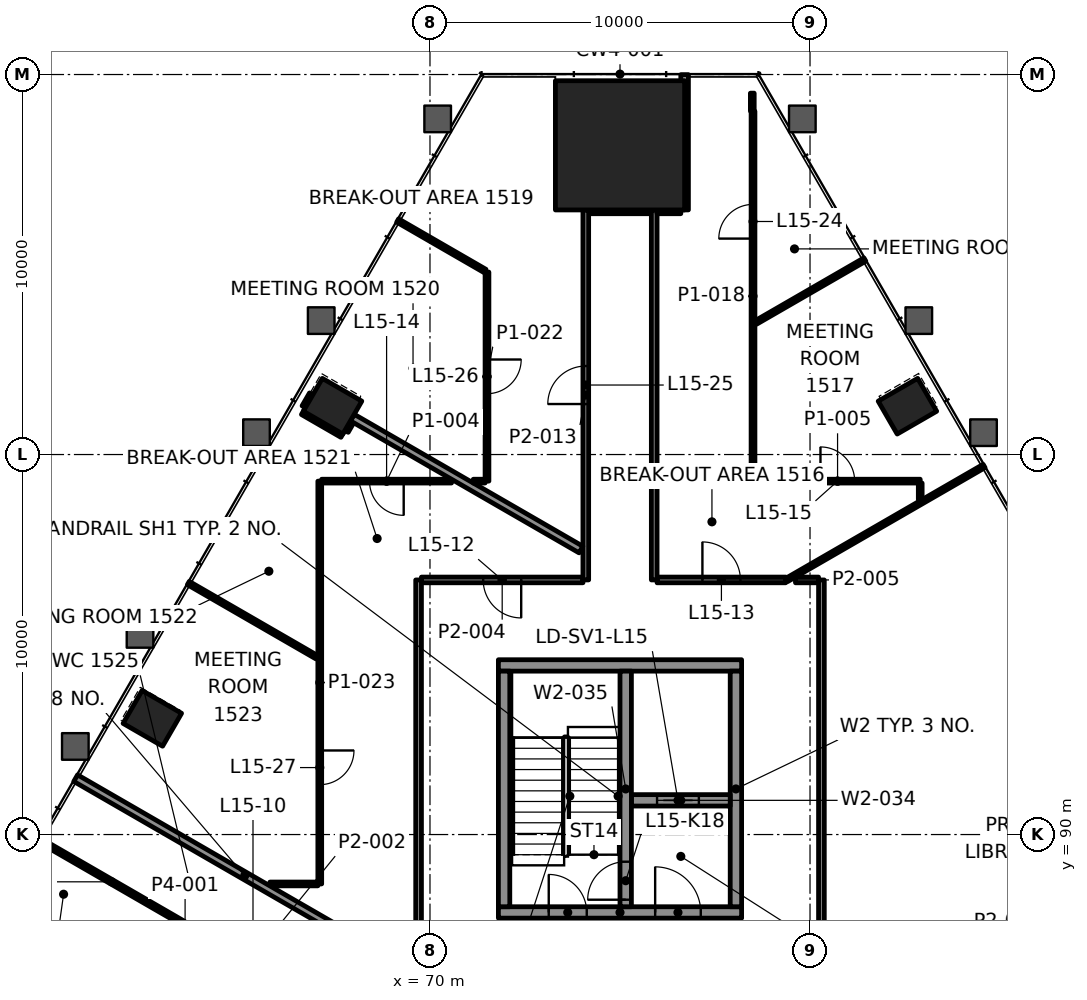
"""IFC4 building model, lengths in metres.
Left out: names, types, materials, properties, quantities, classifications, styles, units other than length and angle.
Written with IfcOpenShell. Run it as: python <this file> out.ifc"""

import sys

from ifc_helpers import new_model, si_unit, direction, frame, frame_2d, origin, origin_2d, place, context, subcontext, project, spatial, rectangle, extrude, element, fill, save


model = new_model("IFC4")
c1 = context("Model", 3, precision=1e-05, world=origin(), true_north=direction((0.0, 1.0)))
c2 = subcontext(c1, "Body", "Model", "MODEL_VIEW")
j1 = project(units=[si_unit("LENGTHUNIT", "METRE"), si_unit("PLANEANGLEUNIT", "RADIAN")], contexts=[c1])
p1 = place(None, origin())
s1 = spatial("IfcSite", under=j1, at=p1, CompositionType="ELEMENT")
p2 = place(p1, origin())
s2 = spatial("IfcBuilding", under=s1, at=p2, CompositionType="ELEMENT")
p3 = place(p2, frame((0.0, 0.0, 69.4)))
s3 = spatial("IfcBuildingStorey", under=s2, at=p3, CompositionType="ELEMENT", Elevation=69.4)
p4 = place(p3, frame((75.0, 108.136, 0.0), z_axis=(0.0, 0.0, 1.0), x_axis=(-1.0, 0.0, 0.0)))
e1 = element("IfcColumn", 1, at=p4, inside=s3, PredefinedType="COLUMN", context=c2, shape_type="SweptSolid", body=[
    extrude(rectangle(XDim=3.4, YDim=3.4, at=origin_2d()), origin(), (0.0, 0.0, 1.0), 4.2),
])
for number, where, z_axis, x_axis in (
    (2, (82.563, 101.272, -0.0), (0.0, 0.0, 1.0), (-0.5, 0.866, 0.0)),
    (3, (67.437, 101.272, -0.0), (0.0, 0.0, 1.0), (-0.5, -0.866, 0.0)),
    (4, (62.694, 93.057, -0.0), (0.0, 0.0, 1.0), (-0.5, -0.866, 0.0)),
):
    element("IfcColumn", number, at=place(p3, frame(where, z_axis=z_axis, x_axis=x_axis)), inside=s3, PredefinedType="COLUMN", context=c2, shape_type="SweptSolid", body=[
        extrude(rectangle(XDim=1.0, YDim=1.2, at=origin_2d()), origin(), (0.0, 0.0, 1.0), 4.2),
    ])
p5 = place(p3, frame((71.8, 87.95, 0.0), z_axis=(0.0, 0.0, 1.0), x_axis=(1.0, 0.0, 0.0)))
e5 = element("IfcWall", 5, at=p5, inside=s3, PredefinedType="SHEAR", context=c2, shape_type="SweptSolid", body=[
    extrude(rectangle(XDim=6.4, YDim=0.3, at=frame_2d((3.2, 0.0))), origin(), (0.0, 0.0, 1.0), 4.0),
])
p6 = place(p5, frame((1.325, 0.0, 0.0)))
e6 = element("IfcOpeningElement", 6, at=p6, cuts=e5, PredefinedType="OPENING", context=c2, shape_type="SweptSolid", body=[
    extrude(rectangle(XDim=1.0, YDim=2.1, at=frame_2d((0.5, 1.05))), frame((0.0, 0.16, 0.0), z_axis=(0.0, -1.0, 0.0), x_axis=(1.0, 0.0, 0.0)), (0.0, 0.0, 1.0), 0.32),
])
p7 = place(p5, frame((4.125, 0.0, 0.0)))
e7 = element("IfcOpeningElement", 7, at=p7, cuts=e5, PredefinedType="OPENING", context=c2, shape_type="SweptSolid", body=[
    extrude(rectangle(XDim=1.2, YDim=2.1, at=frame_2d((0.6, 1.05))), frame((0.0, 0.16, 0.0), z_axis=(0.0, -1.0, 0.0), x_axis=(1.0, 0.0, 0.0)), (0.0, 0.0, 1.0), 0.32),
])
p8 = place(p3, frame((71.8, 94.45, 0.0), z_axis=(0.0, 0.0, 1.0), x_axis=(1.0, 0.0, 0.0)))
e8 = element("IfcWall", 8, at=p8, inside=s3, PredefinedType="SHEAR", context=c2, shape_type="SweptSolid", body=[
    extrude(rectangle(XDim=6.4, YDim=0.3, at=frame_2d((3.2, 0.0))), origin(), (0.0, 0.0, 1.0), 4.0),
])
for number, where, z_axis, x_axis in (
    (9, (71.95, 88.1, 0.0), (0.0, 0.0, 1.0), (0.0, 1.0, 0.0)),
    (10, (78.05, 88.1, 0.0), (0.0, 0.0, 1.0), (0.0, 1.0, 0.0)),
):
    element("IfcWall", number, at=place(p3, frame(where, z_axis=z_axis, x_axis=x_axis)), inside=s3, PredefinedType="SHEAR", context=c2, shape_type="SweptSolid", body=[
        extrude(rectangle(XDim=6.2, YDim=0.3, at=frame_2d((3.1, 0.0))), origin(), (0.0, 0.0, 1.0), 4.0),
    ])
p9 = place(p3, frame((75.3, 90.9, 0.0), z_axis=(0.0, 0.0, 1.0), x_axis=(1.0, 0.0, 0.0)))
e11 = element("IfcWall", 11, at=p9, inside=s3, PredefinedType="SHEAR", context=c2, shape_type="SweptSolid", body=[
    extrude(rectangle(XDim=2.6, YDim=0.3, at=frame_2d((1.3, 0.0))), origin(), (0.0, 0.0, 1.0), 4.0),
])
p10 = place(p9, frame((0.675, 0.0, 0.0)))
e12 = element("IfcOpeningElement", 12, at=p10, cuts=e11, PredefinedType="OPENING", context=c2, shape_type="SweptSolid", body=[
    extrude(rectangle(XDim=1.1, YDim=2.1, at=frame_2d((0.55, 1.05))), frame((0.0, 0.16, 0.0), z_axis=(0.0, -1.0, 0.0), x_axis=(1.0, 0.0, 0.0)), (0.0, 0.0, 1.0), 0.32),
])
p11 = place(p3, frame((75.15, 88.1, 0.0), z_axis=(0.0, 0.0, 1.0), x_axis=(0.0, 1.0, 0.0)))
e13 = element("IfcWall", 13, at=p11, inside=s3, PredefinedType="SHEAR", context=c2, shape_type="SweptSolid", body=[
    extrude(rectangle(XDim=6.2, YDim=0.3, at=frame_2d((3.1, 0.0))), origin(), (0.0, 0.0, 1.0), 4.0),
])
p12 = place(p11, frame((0.185, 0.0, 0.0)))
e14 = element("IfcOpeningElement", 14, at=p12, cuts=e13, PredefinedType="OPENING", context=c2, shape_type="SweptSolid", body=[
    extrude(rectangle(XDim=1.0, YDim=2.1, at=frame_2d((0.5, 1.05))), frame((0.0, 0.16, 0.0), z_axis=(0.0, -1.0, 0.0), x_axis=(1.0, 0.0, 0.0)), (0.0, 0.0, 1.0), 0.32),
])
p13 = place(p3, frame((65.789, 88.7, 0.0), z_axis=(0.0, 0.0, 1.0), x_axis=(1.0, 0.0, 0.0)))
e15 = element("IfcWall", 15, at=p13, inside=s3, PredefinedType="PARTITIONING", context=c2, shape_type="SweptSolid", body=[
    extrude(rectangle(XDim=1.261, YDim=0.1, at=frame_2d((0.631, 0.0))), origin(), (0.0, 0.0, 1.0), 3.4),
])
p14 = place(p3, frame((74.025, 96.7, 0.0), z_axis=(0.0, 0.0, 1.0), x_axis=(-1.0, 0.0, 0.0)))
e16 = element("IfcWall", 16, at=p14, inside=s3, PredefinedType="PARTITIONING", context=c2, shape_type="SweptSolid", body=[
    extrude(rectangle(XDim=4.25, YDim=0.15, at=frame_2d((2.125, 0.0))), origin(), (0.0, 0.0, 1.0), 3.4),
])
p15 = place(p14, frame((1.625, 0.0, 0.0)))
e17 = element("IfcOpeningElement", 17, at=p15, cuts=e16, PredefinedType="OPENING", context=c2, shape_type="SweptSolid", body=[
    extrude(rectangle(XDim=1.0, YDim=2.1, at=frame_2d((0.5, 1.05))), frame((0.0, 0.085, 0.0), z_axis=(0.0, -1.0, 0.0), x_axis=(1.0, 0.0, 0.0)), (0.0, 0.0, 1.0), 0.17),
])
p16 = place(p3, frame((75.975, 96.7, 0.0), z_axis=(0.0, 0.0, 1.0), x_axis=(1.0, 0.0, 0.0)))
e18 = element("IfcWall", 18, at=p16, inside=s3, PredefinedType="PARTITIONING", context=c2, shape_type="SweptSolid", body=[
    extrude(rectangle(XDim=3.387, YDim=0.15, at=frame_2d((1.693, 0.0))), origin(), (0.0, 0.0, 1.0), 3.4),
])
p17 = place(p16, frame((1.194, 0.0, 0.0)))
e19 = element("IfcOpeningElement", 19, at=p17, cuts=e18, PredefinedType="OPENING", context=c2, shape_type="SweptSolid", body=[
    extrude(rectangle(XDim=1.0, YDim=2.1, at=frame_2d((0.5, 1.05))), frame((0.0, 0.085, 0.0), z_axis=(0.0, -1.0, 0.0), x_axis=(1.0, 0.0, 0.0)), (0.0, 0.0, 1.0), 0.17),
])
p18 = place(p3, frame((70.567, 99.3, 0.0), z_axis=(0.0, 0.0, 1.0), x_axis=(-1.0, 0.0, 0.0)))
e20 = element("IfcWall", 20, at=p18, inside=s3, PredefinedType="PARTITIONING", context=c2, shape_type="SweptSolid", body=[
    extrude(rectangle(XDim=3.417, YDim=0.1, at=frame_2d((1.708, 0.0))), origin(), (0.0, 0.0, 1.0), 3.4),
])
p19 = place(p18, frame((1.258, 0.0, 0.0)))
e21 = element("IfcOpeningElement", 21, at=p19, cuts=e20, PredefinedType="OPENING", context=c2, shape_type="SweptSolid", body=[
    extrude(rectangle(XDim=0.9, YDim=2.1, at=frame_2d((0.45, 1.05))), frame((0.0, 0.06, 0.0), z_axis=(0.0, -1.0, 0.0), x_axis=(1.0, 0.0, 0.0)), (0.0, 0.0, 1.0), 0.12),
])
p20 = place(p3, frame((78.55, 99.3, 0.0), z_axis=(0.0, 0.0, 1.0), x_axis=(1.0, 0.0, 0.0)))
e22 = element("IfcWall", 22, at=p20, inside=s3, PredefinedType="PARTITIONING", context=c2, shape_type="SweptSolid", body=[
    extrude(rectangle(XDim=4.349, YDim=0.1, at=frame_2d((2.175, 0.0))), origin(), (0.0, 0.0, 1.0), 3.4),
])
p21 = place(p20, frame((1.725, 0.0, 0.0)))
e23 = element("IfcOpeningElement", 23, at=p21, cuts=e22, PredefinedType="OPENING", context=c2, shape_type="SweptSolid", body=[
    extrude(rectangle(XDim=0.9, YDim=2.1, at=frame_2d((0.45, 1.05))), frame((0.0, 0.06, 0.0), z_axis=(0.0, -1.0, 0.0), x_axis=(1.0, 0.0, 0.0)), (0.0, 0.0, 1.0), 0.12),
])
p22 = place(p3, frame((74.176, 106.437, 0.0), z_axis=(0.0, 0.0, 1.0), x_axis=(1.0, 0.0, 0.0)))
e24 = element("IfcWall", 24, at=p22, inside=s3, PredefinedType="PARTITIONING", context=c2, shape_type="SweptSolid", body=[
    extrude(rectangle(XDim=1.649, YDim=0.2, at=frame_2d((0.825, 0.0))), origin(), (0.0, 0.0, 1.0), 3.397),
])
p23 = place(p3, frame((79.387, 96.7, 0.0), z_axis=(0.0, 0.0, 1.0), x_axis=(0.866032365835, 0.499987941182, 0.0)))
e25 = element("IfcWall", 25, at=p23, inside=s3, PredefinedType="PARTITIONING", context=c2, shape_type="SweptSolid", body=[
    extrude(rectangle(XDim=5.997, YDim=0.1, at=frame_2d((2.999, 0.0))), origin(), (0.0, 0.0, 1.0), 3.165),
])
p24 = place(p3, frame((78.576, 103.476, 0.0), z_axis=(0.0, 0.0, 1.0), x_axis=(0.866043162687, 0.499969239416, 0.0)))
e26 = element("IfcWall", 26, at=p24, inside=s3, PredefinedType="PARTITIONING", context=c2, shape_type="SweptSolid", body=[
    extrude(rectangle(XDim=3.311, YDim=0.1, at=frame_2d((1.656, 0.0))), origin(), (0.0, 0.0, 1.0), 3.4),
])
p25 = place(p3, frame((67.761, 100.634, 0.0), z_axis=(0.0, 0.0, 1.0), x_axis=(0.500305662732, 0.865848857387, 0.0)))
e27 = element("IfcWall", 27, at=p25, inside=s3, PredefinedType="PARTITIONING", context=c2, shape_type="SweptSolid", body=[
    extrude(rectangle(XDim=0.29, YDim=0.2, at=frame_2d((0.145, 0.0))), origin(), (0.0, 0.0, 1.0), 3.4),
])
p26 = place(p3, frame((66.721, 101.232, 0.0), z_axis=(0.0, 0.0, 1.0), x_axis=(0.500080938595, 0.865978668822, 0.0)))
e28 = element("IfcWall", 28, at=p26, inside=s3, PredefinedType="PARTITIONING", context=c2, shape_type="SweptSolid", body=[
    extrude(rectangle(XDim=0.393, YDim=0.2, at=frame_2d((0.197, 0.0))), origin(), (0.0, 0.0, 1.0), 3.4),
])
p27 = place(p3, frame((82.9, 98.816, 0.0), z_axis=(0.0, 0.0, 1.0), x_axis=(0.0, 1.0, 0.0)))
e29 = element("IfcWall", 29, at=p27, inside=s3, PredefinedType="PARTITIONING", context=c2, shape_type="SweptSolid", body=[
    extrude(rectangle(XDim=0.433, YDim=0.1, at=frame_2d((0.217, 0.0))), origin(), (0.0, 0.0, 1.0), 3.4),
])
p28 = place(p3, frame((80.3, 86.1, 0.0), z_axis=(0.0, 0.0, 1.0), x_axis=(0.0, 1.0, 0.0)))
e30 = element("IfcWall", 30, at=p28, inside=s3, PredefinedType="PARTITIONING", context=c2, shape_type="SweptSolid", body=[
    extrude(rectangle(XDim=10.599, YDim=0.15, at=frame_2d((5.3, 0.0))), origin(), (0.0, 0.0, 1.0), 3.4),
])
p29 = place(p3, frame((78.5, 99.3, 0.0), z_axis=(0.0, 0.0, 1.0), x_axis=(0.0, 1.0, 0.0)))
e31 = element("IfcWall", 31, at=p29, inside=s3, PredefinedType="PARTITIONING", context=c2, shape_type="SweptSolid", body=[
    extrude(rectangle(XDim=9.736, YDim=0.1, at=frame_2d((4.868, 0.0))), origin(), (0.0, 0.0, 1.0), 3.4),
])
p30 = place(p29, frame((6.382, 0.0, 0.0)))
e32 = element("IfcOpeningElement", 32, at=p30, cuts=e31, PredefinedType="OPENING", context=c2, shape_type="SweptSolid", body=[
    extrude(rectangle(XDim=0.9, YDim=2.1, at=frame_2d((0.45, 1.05))), frame((0.0, 0.06, 0.0), z_axis=(0.0, -1.0, 0.0), x_axis=(1.0, 0.0, 0.0)), (0.0, 0.0, 1.0), 0.12),
])
p31 = place(p3, frame((78.481, 109.037, 0.0), z_axis=(0.0, 0.0, 1.0), x_axis=(0.0, 1.0, 0.0)))
e33 = element("IfcWall", 33, at=p31, inside=s3, PredefinedType="PARTITIONING", context=c2, shape_type="SweptSolid", body=[
    extrude(rectangle(XDim=0.473, YDim=0.1, at=frame_2d((0.237, 0.0))), origin(), (0.0, 0.0, 1.0), 3.4),
])
p32 = place(p3, frame((76.7, 106.437, 0.0), z_axis=(0.0, 0.0, 1.0), x_axis=(0.0, 1.0, 0.0)))
e34 = element("IfcWall", 34, at=p32, inside=s3, PredefinedType="PARTITIONING", context=c2, shape_type="SweptSolid", body=[
    extrude(rectangle(XDim=3.56, YDim=0.2, at=frame_2d((1.78, 0.0))), origin(), (0.0, 0.0, 1.0), 3.4),
])
p33 = place(p3, frame((75.9, 96.7, 0.0), z_axis=(0.0, 0.0, 1.0), x_axis=(0.0, 1.0, 0.0)))
e35 = element("IfcWall", 35, at=p33, inside=s3, PredefinedType="PARTITIONING", context=c2, shape_type="SweptSolid", body=[
    extrude(rectangle(XDim=9.737, YDim=0.15, at=frame_2d((4.868, 0.0))), origin(), (0.0, 0.0, 1.0), 3.4),
])
p34 = place(p3, frame((74.1, 96.7, 0.0), z_axis=(0.0, 0.0, 1.0), x_axis=(0.0, 1.0, 0.0)))
e36 = element("IfcWall", 36, at=p34, inside=s3, PredefinedType="PARTITIONING", context=c2, shape_type="SweptSolid", body=[
    extrude(rectangle(XDim=9.736, YDim=0.15, at=frame_2d((4.868, 0.0))), origin(), (0.0, 0.0, 1.0), 3.4),
])
p35 = place(p34, frame((4.629, 0.0, 0.0)))
e37 = element("IfcOpeningElement", 37, at=p35, cuts=e36, PredefinedType="OPENING", context=c2, shape_type="SweptSolid", body=[
    extrude(rectangle(XDim=1.0, YDim=2.1, at=frame_2d((0.5, 1.05))), frame((0.0, 0.085, 0.0), z_axis=(0.0, -1.0, 0.0), x_axis=(1.0, 0.0, 0.0)), (0.0, 0.0, 1.0), 0.17),
])
p36 = place(p3, frame((71.5, 104.801, 0.0), z_axis=(0.0, 0.0, 1.0), x_axis=(0.0, -1.0, 0.0)))
e38 = element("IfcWall", 38, at=p36, inside=s3, PredefinedType="PARTITIONING", context=c2, shape_type="SweptSolid", body=[
    extrude(rectangle(XDim=5.501, YDim=0.1, at=frame_2d((2.75, 0.0))), origin(), (0.0, 0.0, 1.0), 3.4),
])
p37 = place(p36, frame((2.301, 0.0, 0.0)))
e39 = element("IfcOpeningElement", 39, at=p37, cuts=e38, PredefinedType="OPENING", context=c2, shape_type="SweptSolid", body=[
    extrude(rectangle(XDim=0.9, YDim=2.1, at=frame_2d((0.45, 1.05))), frame((0.0, 0.06, 0.0), z_axis=(0.0, -1.0, 0.0), x_axis=(1.0, 0.0, 0.0)), (0.0, 0.0, 1.0), 0.12),
])
p38 = place(p3, frame((69.7, 86.1, 0.0), z_axis=(0.0, 0.0, 1.0), x_axis=(0.0, 1.0, 0.0)))
e40 = element("IfcWall", 40, at=p38, inside=s3, PredefinedType="PARTITIONING", context=c2, shape_type="SweptSolid", body=[
    extrude(rectangle(XDim=10.6, YDim=0.15, at=frame_2d((5.3, 0.0))), origin(), (0.0, 0.0, 1.0), 3.4),
])
p39 = place(p3, frame((67.1, 99.3, 0.0), z_axis=(0.0, 0.0, 1.0), x_axis=(0.0, -1.0, 0.0)))
e41 = element("IfcWall", 41, at=p39, inside=s3, PredefinedType="PARTITIONING", context=c2, shape_type="SweptSolid", body=[
    extrude(rectangle(XDim=10.6, YDim=0.1, at=frame_2d((5.3, 0.0))), origin(), (0.0, 0.0, 1.0), 3.4),
])
p40 = place(p39, frame((7.088, 0.0, 0.0)))
e42 = element("IfcOpeningElement", 42, at=p40, cuts=e41, PredefinedType="OPENING", context=c2, shape_type="SweptSolid", body=[
    extrude(rectangle(XDim=0.9, YDim=2.1, at=frame_2d((0.45, 1.05))), frame((0.0, 0.06, 0.0), z_axis=(0.0, -1.0, 0.0), x_axis=(1.0, 0.0, 0.0)), (0.0, 0.0, 1.0), 0.12),
])
p41 = place(p3, frame((71.45, 104.83, 0.0), z_axis=(0.0, 0.0, 1.0), x_axis=(-0.866023371876, 0.500003519352, 0.0)))
e43 = element("IfcWall", 43, at=p41, inside=s3, PredefinedType="PARTITIONING", context=c2, shape_type="SweptSolid", body=[
    extrude(rectangle(XDim=2.657, YDim=0.1, at=frame_2d((1.328, 0.0))), origin(), (0.0, 0.0, 1.0), 3.4),
])
p42 = place(p3, frame((73.973, 97.499, 0.0), z_axis=(0.0, 0.0, 1.0), x_axis=(-0.866037536751, 0.499978984496, 0.0)))
e44 = element("IfcWall", 44, at=p42, inside=s3, PredefinedType="PARTITIONING", context=c2, shape_type="SweptSolid", body=[
    extrude(rectangle(XDim=6.948, YDim=0.2, at=frame_2d((3.474, 0.0))), origin(), (0.0, 0.0, 1.0), 3.4),
])
p43 = place(p3, frame((67.707, 100.539, 0.0), z_axis=(0.0, 0.0, 1.0), x_axis=(-0.865955154139, 0.50012165622, 0.0)))
e45 = element("IfcWall", 45, at=p43, inside=s3, PredefinedType="PARTITIONING", context=c2, shape_type="SweptSolid", body=[
    extrude(rectangle(XDim=1.2, YDim=0.2, at=frame_2d((0.6, 0.0))), origin(), (0.0, 0.0, 1.0), 3.165),
])
p44 = place(p3, frame((67.024, 94.665, 0.0), z_axis=(0.0, 0.0, 1.0), x_axis=(-0.866046116492, 0.499964122822, 0.0)))
e46 = element("IfcWall", 46, at=p44, inside=s3, PredefinedType="PARTITIONING", context=c2, shape_type="SweptSolid", body=[
    extrude(rectangle(XDim=3.906, YDim=0.1, at=frame_2d((1.953, 0.0))), origin(), (0.0, 0.0, 1.0), 3.165),
])
p45 = place(p3, frame((69.573, 86.348, 0.0), z_axis=(0.0, 0.0, 1.0), x_axis=(-0.866024495625, 0.500001572974, 0.0)))
e47 = element("IfcWall", 47, at=p45, inside=s3, PredefinedType="PARTITIONING", context=c2, shape_type="SweptSolid", body=[
    extrude(rectangle(XDim=10.272, YDim=0.2, at=frame_2d((5.136, 0.0))), origin(), (0.0, 0.0, 1.0), 3.165),
])
p46 = place(p3, frame((63.512, 87.665, 0.0), z_axis=(0.0, 0.0, 1.0), x_axis=(-0.866014185868, 0.500019429497, 0.0)))
e48 = element("IfcWall", 48, at=p46, inside=s3, PredefinedType="PARTITIONING", context=c2, shape_type="SweptSolid", body=[
    extrude(rectangle(XDim=4.365, YDim=0.12, at=frame_2d((2.182, 0.0))), origin(), (0.0, 0.0, 1.0), 3.165),
])
p47 = place(p3, frame((79.617, 96.7, 0.0), z_axis=(0.0, 0.0, 1.0), x_axis=(1.0, 0.0, 0.0)))
e49 = element("IfcWall", 49, at=p47, inside=s3, PredefinedType="PARTITIONING", context=c2, shape_type="SweptSolid", body=[
    extrude(rectangle(XDim=0.607, YDim=0.15, at=frame_2d((0.304, 0.0))), origin(), (0.0, 0.0, 1.0), 3.4),
])
p48 = place(p3, frame((71.14, 99.3, 0.0), z_axis=(0.0, 0.0, 1.0), x_axis=(1.0, 0.0, 0.0)))
e50 = element("IfcWall", 50, at=p48, inside=s3, PredefinedType="PARTITIONING", context=c2, shape_type="SweptSolid", body=[
    extrude(rectangle(XDim=0.31, YDim=0.1, at=frame_2d((0.155, 0.0))), origin(), (0.0, 0.0, 1.0), 3.4),
])
p49 = place(p3, frame((75.975, 106.437, 0.0), z_axis=(0.0, 0.0, 1.0), x_axis=(1.0, 0.0, 0.0)))
e51 = element("IfcWall", 51, at=p49, inside=s3, PredefinedType="PARTITIONING", context=c2, shape_type="SweptSolid", body=[
    extrude(rectangle(XDim=0.625, YDim=0.2, at=frame_2d((0.312, 0.0))), origin(), (0.0, 0.0, 1.0), 3.4),
])
p50 = place(p15, origin())
e52 = element("IfcDoor", 52, at=p50, inside=s3, OperationType="SINGLE_SWING_LEFT", PredefinedType="DOOR", context=c2, shape_type="SweptSolid", body=[
    extrude(rectangle(XDim=1.0, YDim=2.1, at=frame_2d((0.5, 1.05))), frame((0.0, 0.025, 0.0), z_axis=(0.0, -1.0, 0.0), x_axis=(1.0, 0.0, 0.0)), (0.0, 0.0, 1.0), 0.05),
])
fill(e17, e52)
p51 = place(p17, origin())
e53 = element("IfcDoor", 53, at=p51, inside=s3, OperationType="SINGLE_SWING_LEFT", PredefinedType="DOOR", context=c2, shape_type="SweptSolid", body=[
    extrude(rectangle(XDim=1.0, YDim=2.1, at=frame_2d((0.5, 1.05))), frame((0.0, 0.025, 0.0), z_axis=(0.0, -1.0, 0.0), x_axis=(1.0, 0.0, 0.0)), (0.0, 0.0, 1.0), 0.05),
])
fill(e19, e53)
p52 = place(p19, origin())
e54 = element("IfcDoor", 54, at=p52, inside=s3, OperationType="SINGLE_SWING_RIGHT", PredefinedType="DOOR", context=c2, shape_type="SweptSolid", body=[
    extrude(rectangle(XDim=0.9, YDim=2.1, at=frame_2d((0.45, 1.05))), frame((0.0, 0.025, 0.0), z_axis=(0.0, -1.0, 0.0), x_axis=(1.0, 0.0, 0.0)), (0.0, 0.0, 1.0), 0.05),
])
fill(e21, e54)
p53 = place(p21, origin())
e55 = element("IfcDoor", 55, at=p53, inside=s3, OperationType="SINGLE_SWING_RIGHT", PredefinedType="DOOR", context=c2, shape_type="SweptSolid", body=[
    extrude(rectangle(XDim=0.9, YDim=2.1, at=frame_2d((0.45, 1.05))), frame((0.0, 0.025, 0.0), z_axis=(0.0, -1.0, 0.0), x_axis=(1.0, 0.0, 0.0)), (0.0, 0.0, 1.0), 0.05),
])
fill(e23, e55)
p54 = place(p30, origin())
e56 = element("IfcDoor", 56, at=p54, inside=s3, OperationType="SINGLE_SWING_LEFT", PredefinedType="DOOR", context=c2, shape_type="SweptSolid", body=[
    extrude(rectangle(XDim=0.9, YDim=2.1, at=frame_2d((0.45, 1.05))), frame((0.0, 0.025, 0.0), z_axis=(0.0, -1.0, 0.0), x_axis=(1.0, 0.0, 0.0)), (0.0, 0.0, 1.0), 0.05),
])
fill(e32, e56)
p55 = place(p35, origin())
e57 = element("IfcDoor", 57, at=p55, inside=s3, OperationType="SINGLE_SWING_RIGHT", PredefinedType="DOOR", context=c2, shape_type="SweptSolid", body=[
    extrude(rectangle(XDim=1.0, YDim=2.1, at=frame_2d((0.5, 1.05))), frame((0.0, 0.025, 0.0), z_axis=(0.0, -1.0, 0.0), x_axis=(1.0, 0.0, 0.0)), (0.0, 0.0, 1.0), 0.05),
])
fill(e37, e57)
p56 = place(p37, origin())
e58 = element("IfcDoor", 58, at=p56, inside=s3, OperationType="SINGLE_SWING_RIGHT", PredefinedType="DOOR", context=c2, shape_type="SweptSolid", body=[
    extrude(rectangle(XDim=0.9, YDim=2.1, at=frame_2d((0.45, 1.05))), frame((0.0, 0.025, 0.0), z_axis=(0.0, -1.0, 0.0), x_axis=(1.0, 0.0, 0.0)), (0.0, 0.0, 1.0), 0.05),
])
fill(e39, e58)
p57 = place(p40, origin())
e59 = element("IfcDoor", 59, at=p57, inside=s3, OperationType="SINGLE_SWING_LEFT", PredefinedType="DOOR", context=c2, shape_type="SweptSolid", body=[
    extrude(rectangle(XDim=0.9, YDim=2.1, at=frame_2d((0.45, 1.05))), frame((0.0, 0.025, 0.0), z_axis=(0.0, -1.0, 0.0), x_axis=(1.0, 0.0, 0.0)), (0.0, 0.0, 1.0), 0.05),
])
fill(e42, e59)
p58 = place(p10, origin())
e60 = element("IfcDoor", 60, at=p58, inside=s3, OperationType="DOUBLE_DOOR_SLIDING", PredefinedType="DOOR", context=c2, shape_type="SweptSolid", body=[
    extrude(rectangle(XDim=1.1, YDim=2.1, at=frame_2d((0.55, 1.05))), frame((0.0, 0.025, 0.0), z_axis=(0.0, -1.0, 0.0), x_axis=(1.0, 0.0, 0.0)), (0.0, 0.0, 1.0), 0.05),
])
fill(e12, e60)
p59 = place(p6, origin())
e61 = element("IfcDoor", 61, at=p59, inside=s3, OperationType="SINGLE_SWING_RIGHT", PredefinedType="DOOR", context=c2, shape_type="SweptSolid", body=[
    extrude(rectangle(XDim=1.0, YDim=2.1, at=frame_2d((0.5, 1.05))), frame((0.0, 0.025, 0.0), z_axis=(0.0, -1.0, 0.0), x_axis=(1.0, 0.0, 0.0)), (0.0, 0.0, 1.0), 0.05),
])
fill(e6, e61)
p60 = place(p12, origin())
e62 = element("IfcDoor", 62, at=p60, inside=s3, OperationType="SINGLE_SWING_LEFT", PredefinedType="DOOR", context=c2, shape_type="SweptSolid", body=[
    extrude(rectangle(XDim=1.0, YDim=2.1, at=frame_2d((0.5, 1.05))), frame((0.0, 0.025, 0.0), z_axis=(0.0, -1.0, 0.0), x_axis=(1.0, 0.0, 0.0)), (0.0, 0.0, 1.0), 0.05),
])
fill(e14, e62)
p61 = place(p7, origin())
e63 = element("IfcDoor", 63, at=p61, inside=s3, OperationType="SINGLE_SWING_RIGHT", PredefinedType="DOOR", context=c2, shape_type="SweptSolid", body=[
    extrude(rectangle(XDim=1.2, YDim=2.1, at=frame_2d((0.6, 1.05))), frame((0.0, 0.025, 0.0), z_axis=(0.0, -1.0, 0.0), x_axis=(1.0, 0.0, 0.0)), (0.0, 0.0, 1.0), 0.05),
])
fill(e7, e63)
save(model, sys.argv[1])
